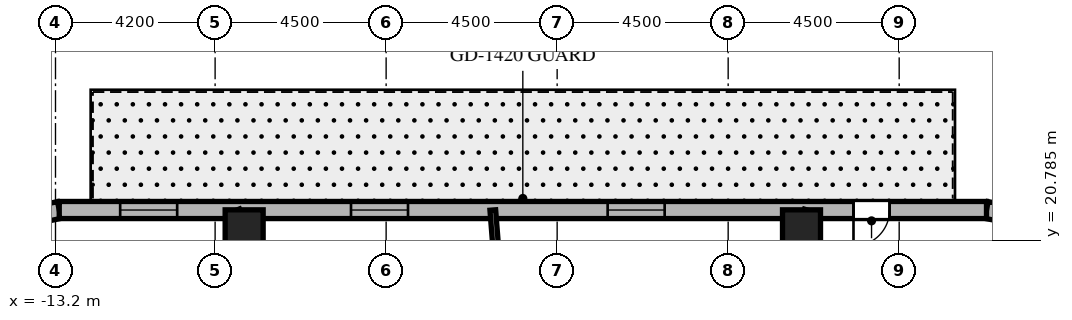
"""IFC4 building model, lengths in metres.
Left out: names, types, materials, properties, quantities, classifications, styles, units other than length and angle.
Written with IfcOpenShell. Run it as: python <this file> out.ifc"""

import sys

from ifc_helpers import new_model, si_unit, direction, frame, frame_2d, origin, origin_2d, place, context, subcontext, project, spatial, rectangle, extrude, element, fill, save


model = new_model("IFC4")
c1 = context("Model", 3, precision=1e-05, world=origin(), true_north=direction((0.0, 1.0)))
c2 = subcontext(c1, "Body", "Model", "MODEL_VIEW")
j1 = project(units=[si_unit("LENGTHUNIT", "METRE"), si_unit("PLANEANGLEUNIT", "RADIAN")], contexts=[c1])
p1 = place(None, origin())
s1 = spatial("IfcSite", under=j1, at=p1, CompositionType="ELEMENT")
p2 = place(p1, origin())
s2 = spatial("IfcBuilding", under=s1, at=p2, CompositionType="ELEMENT")
p3 = place(p2, frame((0.0, 0.0, 248.3)))
s3 = spatial("IfcBuildingStorey", under=s2, at=p3, CompositionType="ELEMENT", Elevation=248.3)
for number, where, z_axis, x_axis in (
    (1, (6.43, 21.08, 0.0), (0.0, 0.0, 1.0), (1.0, 0.0, 0.0)),
    (2, (-8.236, 21.08, 0.0), (0.0, 0.0, 1.0), (1.0, 0.0, 0.0)),
):
    element("IfcColumn", number, at=place(p3, frame(where, z_axis=z_axis, x_axis=x_axis)), inside=s3, PredefinedType="COLUMN", context=c2, shape_type="SweptSolid", body=[
        extrude(rectangle(XDim=1.0, YDim=1.0, at=origin_2d()), origin(), (0.0, 0.0, 1.0), 3.8),
    ])
p4 = place(p3, frame((12.546, 21.34, 0.0), z_axis=(0.0, 0.0, 1.0), x_axis=(-0.982686750835, 0.18527479519, 0.0)))
e3 = element("IfcWall", 3, at=p4, inside=s3, PredefinedType="SOLIDWALL", context=c2, shape_type="SweptSolid", body=[
    extrude(rectangle(XDim=1.27, YDim=0.45, at=frame_2d((0.635, 0.0))), origin(), (0.0, 0.0, 1.0), 3.5),
])
p5 = place(p3, frame((-13.102, 21.575, 0.0), z_axis=(0.0, 0.0, 1.0), x_axis=(-0.978757421505, -0.205021730188, 0.0)))
e4 = element("IfcWall", 4, at=p5, inside=s3, PredefinedType="SOLIDWALL", context=c2, shape_type="SweptSolid", body=[
    extrude(rectangle(XDim=1.406, YDim=0.45, at=frame_2d((0.703, 0.0))), origin(), (0.0, 0.0, 1.0), 3.5),
])
p6 = place(p3, frame((11.298, 21.575, 0.0), z_axis=(0.0, 0.0, 1.0), x_axis=(-1.0, 0.0, 0.0)))
e5 = element("IfcWall", 5, at=p6, inside=s3, PredefinedType="SOLIDWALL", context=c2, shape_type="SweptSolid", body=[
    extrude(rectangle(XDim=24.399, YDim=0.45, at=frame_2d((12.2, 0.0))), origin(), (0.0, 0.0, 1.0), 3.5),
])
p7 = place(p6, frame((2.55, 0.0, 0.0)))
e6 = element("IfcOpeningElement", 6, at=p7, cuts=e5, PredefinedType="OPENING", context=c2, shape_type="SweptSolid", body=[
    extrude(rectangle(XDim=0.95, YDim=2.15, at=frame_2d((0.475, 1.075))), frame((0.0, 0.235, 0.0), z_axis=(0.0, -1.0, 0.0), x_axis=(1.0, 0.0, 0.0)), (0.0, 0.0, 1.0), 0.47),
])
p8 = place(p6, frame((8.469, 0.0, 0.8)))
e7 = element("IfcOpeningElement", 7, at=p8, cuts=e5, PredefinedType="OPENING", context=c2, shape_type="SweptSolid", body=[
    extrude(rectangle(XDim=1.5, YDim=1.8, at=frame_2d((0.75, 0.9))), frame((0.0, 0.235, 0.0), z_axis=(0.0, -1.0, 0.0), x_axis=(1.0, 0.0, 0.0)), (0.0, 0.0, 1.0), 0.47),
])
p9 = place(p6, frame((15.222, 0.0, 0.8)))
e8 = element("IfcOpeningElement", 8, at=p9, cuts=e5, PredefinedType="OPENING", context=c2, shape_type="SweptSolid", body=[
    extrude(rectangle(XDim=1.5, YDim=1.8, at=frame_2d((0.75, 0.9))), frame((0.0, 0.235, 0.0), z_axis=(0.0, -1.0, 0.0), x_axis=(1.0, 0.0, 0.0)), (0.0, 0.0, 1.0), 0.47),
])
p10 = place(p6, frame((21.296, 0.0, 0.8)))
e9 = element("IfcOpeningElement", 9, at=p10, cuts=e5, PredefinedType="OPENING", context=c2, shape_type="SweptSolid", body=[
    extrude(rectangle(XDim=1.5, YDim=1.8, at=frame_2d((0.75, 0.9))), frame((0.0, 0.235, 0.0), z_axis=(0.0, -1.0, 0.0), x_axis=(1.0, 0.0, 0.0)), (0.0, 0.0, 1.0), 0.47),
])
p11 = place(p3, frame((3.004, 9.85, 0.0), z_axis=(0.0, 0.0, 1.0), x_axis=(0.291775760688, 0.956486751333, 0.0)))
e10 = element("IfcWall", 10, at=p11, inside=s3, PredefinedType="PARTITIONING", context=c2, shape_type="SweptSolid", body=[
    extrude(rectangle(XDim=12.258, YDim=0.15, at=frame_2d((6.129, 0.0))), origin(), (0.0, 0.0, 1.0), 2.74),
])
p12 = place(p3, frame((-1.1, 14.018, 0.0), z_axis=(0.0, 0.0, 1.0), x_axis=(-0.078228275349, 0.996935472804, 0.0)))
e11 = element("IfcWall", 11, at=p12, inside=s3, PredefinedType="PARTITIONING", context=c2, shape_type="SweptSolid", body=[
    extrude(rectangle(XDim=7.581, YDim=0.15, at=frame_2d((3.79, 0.0))), origin(), (0.0, 0.0, 1.0), 2.74),
])
p13 = place(p3, frame((-3.848, 9.85, 0.0), z_axis=(0.0, 0.0, 1.0), x_axis=(-0.363921778212, 0.931429513889, 0.0)))
e12 = element("IfcWall", 12, at=p13, inside=s3, PredefinedType="PARTITIONING", context=c2, shape_type="SweptSolid", body=[
    extrude(rectangle(XDim=12.588, YDim=0.15, at=frame_2d((6.294, 0.0))), origin(), (0.0, 0.0, 1.0), 2.74),
])
p14 = place(p7, origin())
e13 = element("IfcDoor", 13, at=p14, inside=s3, OperationType="SINGLE_SWING_RIGHT", PredefinedType="DOOR", context=c2, shape_type="SweptSolid", body=[
    extrude(rectangle(XDim=0.95, YDim=2.15, at=frame_2d((0.475, 1.075))), frame((0.0, 0.025, 0.0), z_axis=(0.0, -1.0, 0.0), x_axis=(1.0, 0.0, 0.0)), (0.0, 0.0, 1.0), 0.05),
])
fill(e6, e13)
p15 = place(p8, origin())
e14 = element("IfcWindow", 14, at=p15, inside=s3, PartitioningType="SINGLE_PANEL", PredefinedType="WINDOW", context=c2, shape_type="SweptSolid", body=[
    extrude(rectangle(XDim=1.5, YDim=1.8, at=frame_2d((0.75, 0.9))), frame((0.0, 0.03, 0.0), z_axis=(0.0, -1.0, 0.0), x_axis=(1.0, 0.0, 0.0)), (0.0, 0.0, 1.0), 0.06),
])
fill(e7, e14)
p16 = place(p9, origin())
e15 = element("IfcWindow", 15, at=p16, inside=s3, PartitioningType="SINGLE_PANEL", PredefinedType="WINDOW", context=c2, shape_type="SweptSolid", body=[
    extrude(rectangle(XDim=1.5, YDim=1.8, at=frame_2d((0.75, 0.9))), frame((0.0, 0.03, 0.0), z_axis=(0.0, -1.0, 0.0), x_axis=(1.0, 0.0, 0.0)), (0.0, 0.0, 1.0), 0.06),
])
fill(e8, e15)
p17 = place(p10, origin())
e16 = element("IfcWindow", 16, at=p17, inside=s3, PartitioningType="SINGLE_PANEL", PredefinedType="WINDOW", context=c2, shape_type="SweptSolid", body=[
    extrude(rectangle(XDim=1.5, YDim=1.8, at=frame_2d((0.75, 0.9))), frame((0.0, 0.03, 0.0), z_axis=(0.0, -1.0, 0.0), x_axis=(1.0, 0.0, 0.0)), (0.0, 0.0, 1.0), 0.06),
])
fill(e9, e16)
save(model, sys.argv[1])
